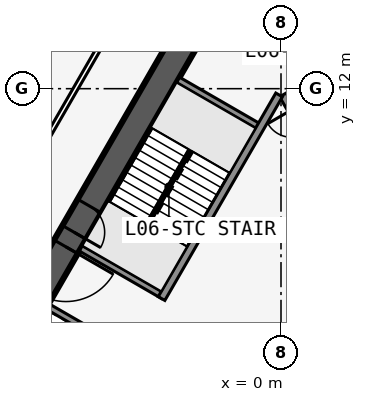
"""IFC4 building model, lengths in metres.
Left out: names, types, materials, properties, quantities, classifications, styles, units other than length and angle.
Written with IfcOpenShell. Run it as: python <this file> out.ifc"""

import sys

from ifc_helpers import new_model, si_unit, direction, frame, frame_2d, origin, place, context, subcontext, project, spatial, rectangle, extrude, element, fill, save


model = new_model("IFC4")
c1 = context("Model", 3, precision=1e-05, world=origin(), true_north=direction((0.0, 1.0)))
c2 = subcontext(c1, "Body", "Model", "MODEL_VIEW")
j1 = project(units=[si_unit("LENGTHUNIT", "METRE"), si_unit("PLANEANGLEUNIT", "RADIAN")], contexts=[c1])
p1 = place(None, origin())
s1 = spatial("IfcSite", under=j1, at=p1, CompositionType="ELEMENT")
p2 = place(p1, origin())
s2 = spatial("IfcBuilding", under=s1, at=p2, CompositionType="ELEMENT")
p3 = place(p2, frame((0.0, 0.0, 31.9)))
s3 = spatial("IfcBuildingStorey", under=s2, at=p3, CompositionType="ELEMENT", Elevation=31.9)
p4 = place(p3, frame((16.5, -9.526, 0.0), z_axis=(0.0, 0.0, 1.0), x_axis=(-0.499999749417, 0.866025548458, 0.0)))
e1 = element("IfcWall", 1, at=p4, inside=s3, PredefinedType="SHEAR", context=c2, shape_type="SweptSolid", body=[
    extrude(rectangle(XDim=33.0, YDim=0.9, at=frame_2d((16.5, 0.0))), origin(), (0.0, 0.0, 1.0), 3.4),
])
p5 = place(p4, frame((14.15, 0.0, 0.0)))
e2 = element("IfcOpeningElement", 2, at=p5, cuts=e1, PredefinedType="OPENING", context=c2, shape_type="SweptSolid", body=[
    extrude(rectangle(XDim=1.8, YDim=2.13, at=frame_2d((0.9, 1.065))), frame((0.0, 0.46, 0.0), z_axis=(0.0, -1.0, 0.0), x_axis=(1.0, 0.0, 0.0)), (0.0, 0.0, 1.0), 0.92),
])
p6 = place(p4, frame((12.6, 0.0, 0.0)))
e3 = element("IfcOpeningElement", 3, at=p6, cuts=e1, PredefinedType="OPENING", context=c2, shape_type="SweptSolid", body=[
    extrude(rectangle(XDim=1.0, YDim=2.13, at=frame_2d((0.5, 1.065))), frame((0.0, 0.46, 0.0), z_axis=(0.0, -1.0, 0.0), x_axis=(1.0, 0.0, 0.0)), (0.0, 0.0, 1.0), 0.92),
])
p7 = place(p3, frame((5.379, 2.586, 0.0), z_axis=(0.0, 0.0, 1.0), x_axis=(-0.500001375892, 0.866024609411, 0.0)))
e4 = element("IfcWall", 4, at=p7, inside=s3, PredefinedType="SOLIDWALL", context=c2, shape_type="SweptSolid", body=[
    extrude(rectangle(XDim=10.633, YDim=0.25, at=frame_2d((5.316, 0.0))), origin(), (0.0, 0.0, 1.0), 3.235),
])
p8 = place(p7, frame((9.164, 0.0, 0.0)))
e5 = element("IfcOpeningElement", 5, at=p8, cuts=e4, PredefinedType="OPENING", context=c2, shape_type="SweptSolid", body=[
    extrude(rectangle(XDim=0.9, YDim=2.13, at=frame_2d((0.45, 1.065))), frame((0.0, 0.135, 0.0), z_axis=(0.0, -1.0, 0.0), x_axis=(1.0, 0.0, 0.0)), (0.0, 0.0, 1.0), 0.27),
])
p9 = place(p7, frame((1.0, 0.0, 0.0)))
e6 = element("IfcOpeningElement", 6, at=p9, cuts=e4, PredefinedType="OPENING", context=c2, shape_type="SweptSolid", body=[
    extrude(rectangle(XDim=1.1, YDim=2.13, at=frame_2d((0.55, 1.065))), frame((0.0, 0.135, 0.0), z_axis=(0.0, -1.0, 0.0), x_axis=(1.0, 0.0, 0.0)), (0.0, 0.0, 1.0), 0.27),
])
p10 = place(p7, frame((3.9, 0.0, 0.0)))
e7 = element("IfcOpeningElement", 7, at=p10, cuts=e4, PredefinedType="OPENING", context=c2, shape_type="SweptSolid", body=[
    extrude(rectangle(XDim=1.1, YDim=2.13, at=frame_2d((0.55, 1.065))), frame((0.0, 0.135, 0.0), z_axis=(0.0, -1.0, 0.0), x_axis=(1.0, 0.0, 0.0)), (0.0, 0.0, 1.0), 0.27),
])
p11 = place(p7, frame((6.8, 0.0, 0.0)))
e8 = element("IfcOpeningElement", 8, at=p11, cuts=e4, PredefinedType="OPENING", context=c2, shape_type="SweptSolid", body=[
    extrude(rectangle(XDim=1.1, YDim=2.13, at=frame_2d((0.55, 1.065))), frame((0.0, 0.135, 0.0), z_axis=(0.0, -1.0, 0.0), x_axis=(1.0, 0.0, 0.0)), (0.0, 0.0, 1.0), 0.27),
])
p12 = place(p3, frame((0.0, 19.052, 0.0), z_axis=(0.0, 0.0, 1.0), x_axis=(-0.499999749417, -0.866025548458, 0.0)))
e9 = element("IfcWall", 9, at=p12, inside=s3, PredefinedType="SHEAR", context=c2, shape_type="SweptSolid", body=[
    extrude(rectangle(XDim=33.0, YDim=0.9, at=frame_2d((16.5, 0.0))), origin(), (0.0, 0.0, 1.0), 3.4),
])
p13 = place(p12, frame((14.15, 0.0, 0.0)))
e10 = element("IfcOpeningElement", 10, at=p13, cuts=e9, PredefinedType="OPENING", context=c2, shape_type="SweptSolid", body=[
    extrude(rectangle(XDim=1.8, YDim=2.13, at=frame_2d((0.9, 1.065))), frame((0.0, 0.46, 0.0), z_axis=(0.0, -1.0, 0.0), x_axis=(1.0, 0.0, 0.0)), (0.0, 0.0, 1.0), 0.92),
])
p14 = place(p12, frame((12.6, 0.0, 0.0)))
e11 = element("IfcOpeningElement", 11, at=p14, cuts=e9, PredefinedType="OPENING", context=c2, shape_type="SweptSolid", body=[
    extrude(rectangle(XDim=1.0, YDim=2.13, at=frame_2d((0.5, 1.065))), frame((0.0, 0.46, 0.0), z_axis=(0.0, -1.0, 0.0), x_axis=(1.0, 0.0, 0.0)), (0.0, 0.0, 1.0), 0.92),
])
p15 = place(p3, frame((-0.062, 11.794, 0.0), z_axis=(0.0, 0.0, 1.0), x_axis=(-0.500006680225, -0.86602154692, 0.0)))
e12 = element("IfcWall", 12, at=p15, inside=s3, PredefinedType="SOLIDWALL", context=c2, shape_type="SweptSolid", body=[
    extrude(rectangle(XDim=7.733, YDim=0.25, at=frame_2d((3.866, 0.0))), origin(), (0.0, 0.0, 1.0), 3.235),
])
for number, where, z_axis, x_axis in (
    (13, (-0.679, 10.727, 0.0), (0.0, 0.0, 1.0), (-0.866, 0.5, 0.0)),
    (14, (-3.879, 5.184, 0.0), (0.0, 0.0, 1.0), (-0.866, 0.5, 0.0)),
    (15, (-4.979, 3.279, 0.0), (0.0, 0.0, 1.0), (-0.866, 0.5, 0.0)),
):
    element("IfcWall", number, at=place(p3, frame(where, z_axis=z_axis, x_axis=x_axis)), inside=s3, PredefinedType="SOLIDWALL", context=c2, shape_type="SweptSolid", body=[
        extrude(rectangle(XDim=3.125, YDim=0.2, at=frame_2d((1.562, 0.0))), origin(), (0.0, 0.0, 1.0), 3.235),
    ])
p16 = place(p3, frame((-0.5, 22.836, 0.0), z_axis=(0.0, 0.0, 1.0), x_axis=(-0.500001677587, -0.866024435227, 0.0)))
e16 = element("IfcWall", 16, at=p16, inside=s3, PredefinedType="PARTITIONING", context=c2, shape_type="SweptSolid", body=[
    extrude(rectangle(XDim=39.054, YDim=0.15, at=frame_2d((19.527, 0.0))), origin(), (0.0, 0.0, 1.0), 3.235),
])
p17 = place(p16, frame((1.558, 0.0, 0.0)))
e17 = element("IfcOpeningElement", 17, at=p17, cuts=e16, PredefinedType="OPENING", context=c2, shape_type="SweptSolid", body=[
    extrude(rectangle(XDim=0.95, YDim=2.13, at=frame_2d((0.475, 1.065))), frame((0.0, 0.085, 0.0), z_axis=(0.0, -1.0, 0.0), x_axis=(1.0, 0.0, 0.0)), (0.0, 0.0, 1.0), 0.17),
])
p18 = place(p16, frame((15.352, 0.0, 0.0)))
e18 = element("IfcOpeningElement", 18, at=p18, cuts=e16, PredefinedType="OPENING", context=c2, shape_type="SweptSolid", body=[
    extrude(rectangle(XDim=0.95, YDim=2.13, at=frame_2d((0.475, 1.065))), frame((0.0, 0.085, 0.0), z_axis=(0.0, -1.0, 0.0), x_axis=(1.0, 0.0, 0.0)), (0.0, 0.0, 1.0), 0.17),
])
p19 = place(p16, frame((22.752, 0.0, 0.0)))
e19 = element("IfcOpeningElement", 19, at=p19, cuts=e16, PredefinedType="OPENING", context=c2, shape_type="SweptSolid", body=[
    extrude(rectangle(XDim=0.95, YDim=2.13, at=frame_2d((0.475, 1.065))), frame((0.0, 0.085, 0.0), z_axis=(0.0, -1.0, 0.0), x_axis=(1.0, 0.0, 0.0)), (0.0, 0.0, 1.0), 0.17),
])
p20 = place(p16, frame((30.952, 0.0, 0.0)))
e20 = element("IfcOpeningElement", 20, at=p20, cuts=e16, PredefinedType="OPENING", context=c2, shape_type="SweptSolid", body=[
    extrude(rectangle(XDim=0.95, YDim=2.13, at=frame_2d((0.475, 1.065))), frame((0.0, 0.085, 0.0), z_axis=(0.0, -1.0, 0.0), x_axis=(1.0, 0.0, 0.0)), (0.0, 0.0, 1.0), 0.17),
])
p21 = place(p16, frame((37.752, 0.0, 0.0)))
e21 = element("IfcOpeningElement", 21, at=p21, cuts=e16, PredefinedType="OPENING", context=c2, shape_type="SweptSolid", body=[
    extrude(rectangle(XDim=0.95, YDim=2.13, at=frame_2d((0.475, 1.065))), frame((0.0, 0.085, 0.0), z_axis=(0.0, -1.0, 0.0), x_axis=(1.0, 0.0, 0.0)), (0.0, 0.0, 1.0), 0.17),
])
p22 = place(p3, frame((-2.988, 9.978, 0.0), z_axis=(0.0, 0.0, 1.0), x_axis=(-0.499992232847, -0.866029888106, 0.0)))
e22 = element("IfcWall", 22, at=p22, inside=s3, PredefinedType="SOLIDWALL", context=c2, shape_type="SweptSolid", body=[
    extrude(rectangle(XDim=2.794, YDim=0.1, at=frame_2d((1.397, 0.0))), origin(), (0.0, 0.0, 1.0), 3.4),
])
p23 = place(p13, origin())
e23 = element("IfcDoor", 23, at=p23, inside=s3, OperationType="DOUBLE_DOOR_SINGLE_SWING", PredefinedType="DOOR", context=c2, shape_type="SweptSolid", body=[
    extrude(rectangle(XDim=1.8, YDim=2.13, at=frame_2d((0.9, 1.065))), frame((0.0, 0.025, 0.0), z_axis=(0.0, -1.0, 0.0), x_axis=(1.0, 0.0, 0.0)), (0.0, 0.0, 1.0), 0.05),
])
fill(e10, e23)
p24 = place(p14, origin())
e24 = element("IfcDoor", 24, at=p24, inside=s3, OperationType="SINGLE_SWING_RIGHT", PredefinedType="DOOR", context=c2, shape_type="SweptSolid", body=[
    extrude(rectangle(XDim=1.0, YDim=2.13, at=frame_2d((0.5, 1.065))), frame((0.0, 0.025, 0.0), z_axis=(0.0, -1.0, 0.0), x_axis=(1.0, 0.0, 0.0)), (0.0, 0.0, 1.0), 0.05),
])
fill(e11, e24)
save(model, sys.argv[1])
